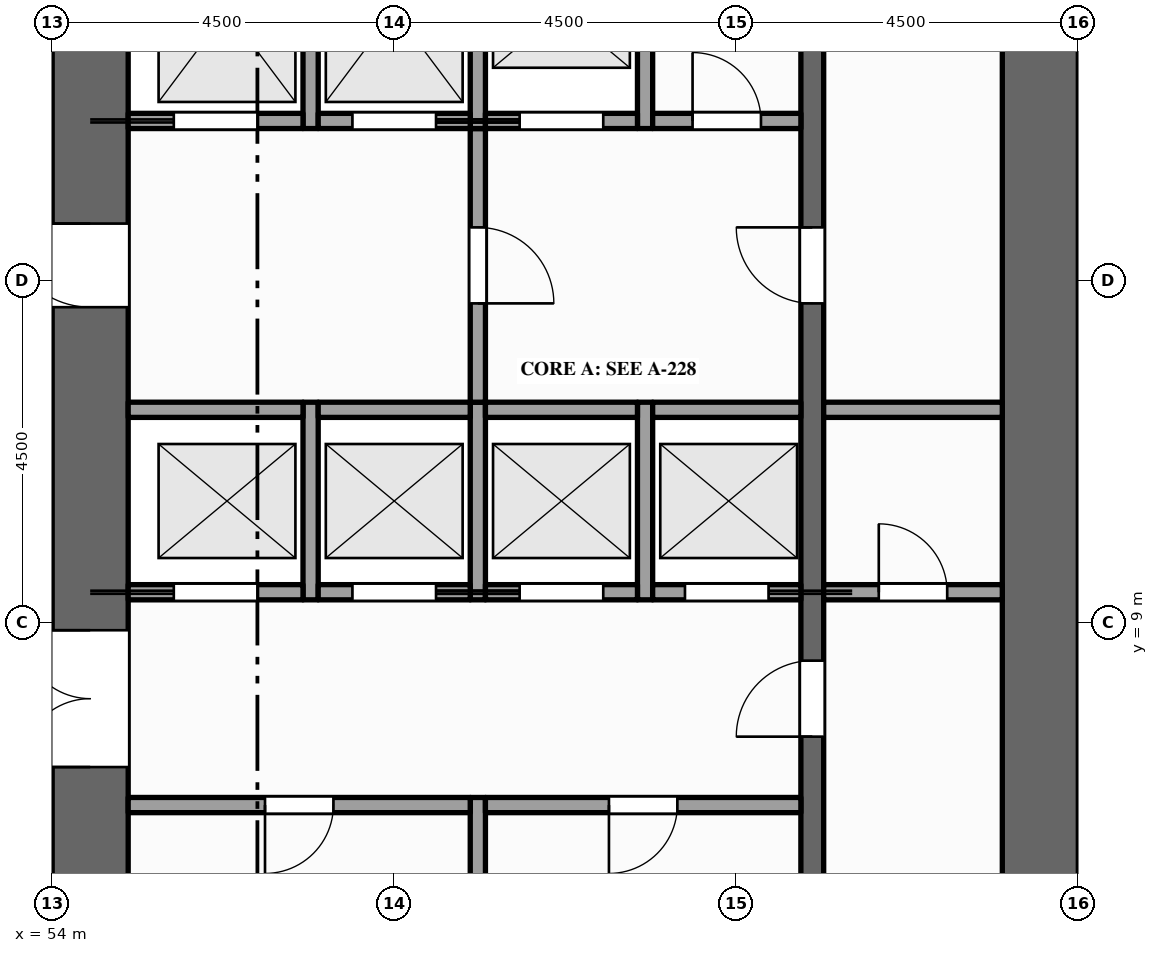
"""IFC4 building model, lengths in metres.
Left out: names, types, materials, properties, quantities, classifications, styles, units other than length and angle.
Written with IfcOpenShell. Run it as: python <this file> out.ifc"""

import sys

from ifc_helpers import new_model, si_unit, direction, frame, frame_2d, origin, place, context, subcontext, project, spatial, rectangle, extrude, element, fill, save


model = new_model("IFC4")
c1 = context("Model", 3, precision=1e-05, world=origin(), true_north=direction((0.0, 1.0)))
c2 = subcontext(c1, "Body", "Model", "MODEL_VIEW")
j1 = project(units=[si_unit("LENGTHUNIT", "METRE"), si_unit("PLANEANGLEUNIT", "RADIAN")], contexts=[c1])
p1 = place(None, origin())
s1 = spatial("IfcSite", under=j1, at=p1, CompositionType="ELEMENT")
p2 = place(p1, origin())
s2 = spatial("IfcBuilding", under=s1, at=p2, CompositionType="ELEMENT")
p3 = place(p2, frame((0.0, 0.0, 151.0)))
s3 = spatial("IfcBuildingStorey", under=s2, at=p3, CompositionType="ELEMENT", Elevation=151.0)
p4 = place(p3, frame((54.5, 1.0, -0.15), z_axis=(0.0, 0.0, 1.0), x_axis=(0.0, 1.0, 0.0)))
e1 = element("IfcWall", 1, at=p4, inside=s3, PredefinedType="SHEAR", context=c2, shape_type="SweptSolid", body=[
    extrude(rectangle(XDim=20.5, YDim=1.0, at=frame_2d((10.25, 0.0))), origin(), (0.0, 0.0, 1.0), 4.0),
])
p5 = place(p4, frame((6.1, 0.0, 0.15)))
e2 = element("IfcOpeningElement", 2, at=p5, cuts=e1, PredefinedType="OPENING", context=c2, shape_type="SweptSolid", body=[
    extrude(rectangle(XDim=1.8, YDim=2.1, at=frame_2d((0.9, 1.05))), frame((0.0, 0.51, 0.0), z_axis=(0.0, -1.0, 0.0), x_axis=(1.0, 0.0, 0.0)), (0.0, 0.0, 1.0), 1.02),
])
p6 = place(p4, frame((12.15, 0.0, 0.15)))
e3 = element("IfcOpeningElement", 3, at=p6, cuts=e1, PredefinedType="OPENING", context=c2, shape_type="SweptSolid", body=[
    extrude(rectangle(XDim=1.1, YDim=2.1, at=frame_2d((0.55, 1.05))), frame((0.0, 0.51, 0.0), z_axis=(0.0, -1.0, 0.0), x_axis=(1.0, 0.0, 0.0)), (0.0, 0.0, 1.0), 1.02),
])
p7 = place(p4, frame((1.15, 0.0, 0.15)))
e4 = element("IfcOpeningElement", 4, at=p7, cuts=e1, PredefinedType="OPENING", context=c2, shape_type="SweptSolid", body=[
    extrude(rectangle(XDim=1.1, YDim=2.1, at=frame_2d((0.55, 1.05))), frame((0.0, 0.51, 0.0), z_axis=(0.0, -1.0, 0.0), x_axis=(1.0, 0.0, 0.0)), (0.0, 0.0, 1.0), 1.02),
])
p8 = place(p4, frame((18.35, 0.0, 0.15)))
e5 = element("IfcOpeningElement", 5, at=p8, cuts=e1, PredefinedType="OPENING", context=c2, shape_type="SweptSolid", body=[
    extrude(rectangle(XDim=1.1, YDim=2.1, at=frame_2d((0.55, 1.05))), frame((0.0, 0.51, 0.0), z_axis=(0.0, -1.0, 0.0), x_axis=(1.0, 0.0, 0.0)), (0.0, 0.0, 1.0), 1.02),
])
p9 = place(p3, frame((67.0, 1.0, -0.15), z_axis=(0.0, 0.0, 1.0), x_axis=(0.0, 1.0, 0.0)))
e6 = element("IfcWall", 6, at=p9, inside=s3, PredefinedType="SHEAR", context=c2, shape_type="SweptSolid", body=[
    extrude(rectangle(XDim=20.5, YDim=1.0, at=frame_2d((10.25, 0.0))), origin(), (0.0, 0.0, 1.0), 4.0),
])
p10 = place(p3, frame((57.4, 9.3, 0.0), z_axis=(0.0, 0.0, 1.0), x_axis=(0.0, 1.0, 0.0)))
e7 = element("IfcWall", 7, at=p10, inside=s3, PredefinedType="SOLIDWALL", context=c2, shape_type="SweptSolid", body=[
    extrude(rectangle(XDim=2.6, YDim=0.2, at=frame_2d((1.3, 0.0))), origin(), (0.0, 0.0, 1.0), 3.85),
])
p11 = place(p3, frame((57.4, 15.5, 0.0), z_axis=(0.0, 0.0, 1.0), x_axis=(0.0, 1.0, 0.0)))
e8 = element("IfcWall", 8, at=p11, inside=s3, PredefinedType="SOLIDWALL", context=c2, shape_type="SweptSolid", body=[
    extrude(rectangle(XDim=2.875, YDim=0.2, at=frame_2d((1.438, 0.0))), origin(), (0.0, 0.0, 1.0), 3.85),
])
p12 = place(p3, frame((59.6, 4.325, 0.0), z_axis=(0.0, 0.0, 1.0), x_axis=(0.0, 1.0, 0.0)))
e9 = element("IfcWall", 9, at=p12, inside=s3, PredefinedType="PARTITIONING", context=c2, shape_type="SweptSolid", body=[
    extrude(rectangle(XDim=2.375, YDim=0.2, at=frame_2d((1.188, 0.0))), origin(), (0.0, 0.0, 1.0), 3.85),
])
p13 = place(p3, frame((59.6, 9.3, 0.0), z_axis=(0.0, 0.0, 1.0), x_axis=(0.0, 1.0, 0.0)))
e10 = element("IfcWall", 10, at=p13, inside=s3, PredefinedType="SOLIDWALL", context=c2, shape_type="SweptSolid", body=[
    extrude(rectangle(XDim=2.6, YDim=0.2, at=frame_2d((1.3, 0.0))), origin(), (0.0, 0.0, 1.0), 3.85),
])
p14 = place(p3, frame((59.6, 11.9, 0.0), z_axis=(0.0, 0.0, 1.0), x_axis=(0.0, 1.0, 0.0)))
e11 = element("IfcWall", 11, at=p14, inside=s3, PredefinedType="PARTITIONING", context=c2, shape_type="SweptSolid", body=[
    extrude(rectangle(XDim=3.6, YDim=0.2, at=frame_2d((1.8, 0.0))), origin(), (0.0, 0.0, 1.0), 3.85),
])
p15 = place(p14, frame((1.3, 0.0, 0.0)))
e12 = element("IfcOpeningElement", 12, at=p15, cuts=e11, PredefinedType="OPENING", context=c2, shape_type="SweptSolid", body=[
    extrude(rectangle(XDim=1.0, YDim=2.1, at=frame_2d((0.5, 1.05))), frame((0.0, 0.11, 0.0), z_axis=(0.0, -1.0, 0.0), x_axis=(1.0, 0.0, 0.0)), (0.0, 0.0, 1.0), 0.22),
])
p16 = place(p3, frame((59.6, 15.5, 0.0), z_axis=(0.0, 0.0, 1.0), x_axis=(0.0, 1.0, 0.0)))
e13 = element("IfcWall", 13, at=p16, inside=s3, PredefinedType="SOLIDWALL", context=c2, shape_type="SweptSolid", body=[
    extrude(rectangle(XDim=2.875, YDim=0.2, at=frame_2d((1.438, 0.0))), origin(), (0.0, 0.0, 1.0), 3.85),
])
p17 = place(p3, frame((61.8, 9.3, 0.0), z_axis=(0.0, 0.0, 1.0), x_axis=(0.0, 1.0, 0.0)))
e14 = element("IfcWall", 14, at=p17, inside=s3, PredefinedType="SOLIDWALL", context=c2, shape_type="SweptSolid", body=[
    extrude(rectangle(XDim=2.6, YDim=0.2, at=frame_2d((1.3, 0.0))), origin(), (0.0, 0.0, 1.0), 3.85),
])
p18 = place(p3, frame((61.8, 15.5, 0.0), z_axis=(0.0, 0.0, 1.0), x_axis=(0.0, 1.0, 0.0)))
e15 = element("IfcWall", 15, at=p18, inside=s3, PredefinedType="SOLIDWALL", context=c2, shape_type="SweptSolid", body=[
    extrude(rectangle(XDim=3.1, YDim=0.2, at=frame_2d((1.55, 0.0))), origin(), (0.0, 0.0, 1.0), 3.85),
])
p19 = place(p3, frame((64.0, 4.1, 0.0), z_axis=(0.0, 0.0, 1.0), x_axis=(0.0, 1.0, 0.0)))
e16 = element("IfcWall", 16, at=p19, inside=s3, PredefinedType="SHEAR", context=c2, shape_type="SweptSolid", body=[
    extrude(rectangle(XDim=14.5, YDim=0.3, at=frame_2d((7.25, 0.0))), origin(), (0.0, 0.0, 1.0), 3.85),
])
p20 = place(p19, frame((3.4, 0.0, 0.0)))
e17 = element("IfcOpeningElement", 17, at=p20, cuts=e16, PredefinedType="OPENING", context=c2, shape_type="SweptSolid", body=[
    extrude(rectangle(XDim=1.0, YDim=2.1, at=frame_2d((0.5, 1.05))), frame((0.0, 0.16, 0.0), z_axis=(0.0, -1.0, 0.0), x_axis=(1.0, 0.0, 0.0)), (0.0, 0.0, 1.0), 0.32),
])
p21 = place(p19, frame((9.1, 0.0, 0.0)))
e18 = element("IfcOpeningElement", 18, at=p21, cuts=e16, PredefinedType="OPENING", context=c2, shape_type="SweptSolid", body=[
    extrude(rectangle(XDim=1.0, YDim=2.1, at=frame_2d((0.5, 1.05))), frame((0.0, 0.16, 0.0), z_axis=(0.0, -1.0, 0.0), x_axis=(1.0, 0.0, 0.0)), (0.0, 0.0, 1.0), 0.32),
])
p22 = place(p3, frame((55.0, 6.6, 0.0), z_axis=(0.0, 0.0, 1.0), x_axis=(1.0, 0.0, 0.0)))
e19 = element("IfcWall", 19, at=p22, inside=s3, PredefinedType="PARTITIONING", context=c2, shape_type="SweptSolid", body=[
    extrude(rectangle(XDim=4.5, YDim=0.2, at=frame_2d((2.25, 0.0))), origin(), (0.0, 0.0, 1.0), 3.85),
])
p23 = place(p22, frame((1.8, 0.0, 0.0)))
e20 = element("IfcOpeningElement", 20, at=p23, cuts=e19, PredefinedType="OPENING", context=c2, shape_type="SweptSolid", body=[
    extrude(rectangle(XDim=0.9, YDim=2.1, at=frame_2d((0.45, 1.05))), frame((0.0, 0.11, 0.0), z_axis=(0.0, -1.0, 0.0), x_axis=(1.0, 0.0, 0.0)), (0.0, 0.0, 1.0), 0.22),
])
p24 = place(p3, frame((59.7, 6.6, 0.0), z_axis=(0.0, 0.0, 1.0), x_axis=(1.0, 0.0, 0.0)))
e21 = element("IfcWall", 21, at=p24, inside=s3, PredefinedType="PARTITIONING", context=c2, shape_type="SweptSolid", body=[
    extrude(rectangle(XDim=4.15, YDim=0.2, at=frame_2d((2.075, 0.0))), origin(), (0.0, 0.0, 1.0), 3.85),
])
p25 = place(p24, frame((1.625, 0.0, 0.0)))
e22 = element("IfcOpeningElement", 22, at=p25, cuts=e21, PredefinedType="OPENING", context=c2, shape_type="SweptSolid", body=[
    extrude(rectangle(XDim=0.9, YDim=2.1, at=frame_2d((0.45, 1.05))), frame((0.0, 0.11, 0.0), z_axis=(0.0, -1.0, 0.0), x_axis=(1.0, 0.0, 0.0)), (0.0, 0.0, 1.0), 0.22),
])
p26 = place(p3, frame((55.0, 9.4, 0.0), z_axis=(0.0, 0.0, 1.0), x_axis=(1.0, 0.0, 0.0)))
e23 = element("IfcWall", 23, at=p26, inside=s3, PredefinedType="SOLIDWALL", context=c2, shape_type="SweptSolid", body=[
    extrude(rectangle(XDim=2.3, YDim=0.2, at=frame_2d((1.15, 0.0))), origin(), (0.0, 0.0, 1.0), 3.85),
])
p27 = place(p26, frame((0.6, 0.0, 0.012)))
e24 = element("IfcOpeningElement", 24, at=p27, cuts=e23, PredefinedType="OPENING", context=c2, shape_type="SweptSolid", body=[
    extrude(rectangle(XDim=1.1, YDim=2.1, at=frame_2d((0.55, 1.05))), frame((0.0, 0.11, 0.0), z_axis=(0.0, -1.0, 0.0), x_axis=(1.0, 0.0, 0.0)), (0.0, 0.0, 1.0), 0.22),
])
p28 = place(p3, frame((57.5, 9.4, 0.0), z_axis=(0.0, 0.0, 1.0), x_axis=(1.0, 0.0, 0.0)))
e25 = element("IfcWall", 25, at=p28, inside=s3, PredefinedType="SOLIDWALL", context=c2, shape_type="SweptSolid", body=[
    extrude(rectangle(XDim=2.0, YDim=0.2, at=frame_2d((1.0, 0.0))), origin(), (0.0, 0.0, 1.0), 3.85),
])
p29 = place(p28, frame((0.45, 0.0, 0.012)))
e26 = element("IfcOpeningElement", 26, at=p29, cuts=e25, PredefinedType="OPENING", context=c2, shape_type="SweptSolid", body=[
    extrude(rectangle(XDim=1.1, YDim=2.1, at=frame_2d((0.55, 1.05))), frame((0.0, 0.11, 0.0), z_axis=(0.0, -1.0, 0.0), x_axis=(1.0, 0.0, 0.0)), (0.0, 0.0, 1.0), 0.22),
])
p30 = place(p3, frame((59.7, 9.4, 0.0), z_axis=(0.0, 0.0, 1.0), x_axis=(1.0, 0.0, 0.0)))
e27 = element("IfcWall", 27, at=p30, inside=s3, PredefinedType="SOLIDWALL", context=c2, shape_type="SweptSolid", body=[
    extrude(rectangle(XDim=2.0, YDim=0.2, at=frame_2d((1.0, 0.0))), origin(), (0.0, 0.0, 1.0), 3.85),
])
p31 = place(p30, frame((0.45, 0.0, 0.012)))
e28 = element("IfcOpeningElement", 28, at=p31, cuts=e27, PredefinedType="OPENING", context=c2, shape_type="SweptSolid", body=[
    extrude(rectangle(XDim=1.1, YDim=2.1, at=frame_2d((0.55, 1.05))), frame((0.0, 0.11, 0.0), z_axis=(0.0, -1.0, 0.0), x_axis=(1.0, 0.0, 0.0)), (0.0, 0.0, 1.0), 0.22),
])
p32 = place(p3, frame((61.9, 9.4, 0.0), z_axis=(0.0, 0.0, 1.0), x_axis=(1.0, 0.0, 0.0)))
e29 = element("IfcWall", 29, at=p32, inside=s3, PredefinedType="SOLIDWALL", context=c2, shape_type="SweptSolid", body=[
    extrude(rectangle(XDim=1.95, YDim=0.2, at=frame_2d((0.975, 0.0))), origin(), (0.0, 0.0, 1.0), 3.85),
])
p33 = place(p32, frame((0.425, 0.0, 0.012)))
e30 = element("IfcOpeningElement", 30, at=p33, cuts=e29, PredefinedType="OPENING", context=c2, shape_type="SweptSolid", body=[
    extrude(rectangle(XDim=1.1, YDim=2.1, at=frame_2d((0.55, 1.05))), frame((0.0, 0.11, 0.0), z_axis=(0.0, -1.0, 0.0), x_axis=(1.0, 0.0, 0.0)), (0.0, 0.0, 1.0), 0.22),
])
p34 = place(p3, frame((64.15, 9.4, 0.0), z_axis=(0.0, 0.0, 1.0), x_axis=(1.0, 0.0, 0.0)))
e31 = element("IfcWall", 31, at=p34, inside=s3, PredefinedType="PARTITIONING", context=c2, shape_type="SweptSolid", body=[
    extrude(rectangle(XDim=2.35, YDim=0.2, at=frame_2d((1.175, 0.0))), origin(), (0.0, 0.0, 1.0), 3.85),
])
p35 = place(p34, frame((0.725, 0.0, 0.0)))
e32 = element("IfcOpeningElement", 32, at=p35, cuts=e31, PredefinedType="OPENING", context=c2, shape_type="SweptSolid", body=[
    extrude(rectangle(XDim=0.9, YDim=2.1, at=frame_2d((0.45, 1.05))), frame((0.0, 0.11, 0.0), z_axis=(0.0, -1.0, 0.0), x_axis=(1.0, 0.0, 0.0)), (0.0, 0.0, 1.0), 0.22),
])
p36 = place(p3, frame((55.0, 11.8, 0.0), z_axis=(0.0, 0.0, 1.0), x_axis=(1.0, 0.0, 0.0)))
e33 = element("IfcWall", 33, at=p36, inside=s3, PredefinedType="SOLIDWALL", context=c2, shape_type="SweptSolid", body=[
    extrude(rectangle(XDim=2.3, YDim=0.2, at=frame_2d((1.15, 0.0))), origin(), (0.0, 0.0, 1.0), 3.85),
])
for number, where, z_axis, x_axis in (
    (34, (57.5, 11.8, 0.0), (0.0, 0.0, 1.0), (1.0, 0.0, 0.0)),
    (35, (59.7, 11.8, 0.0), (0.0, 0.0, 1.0), (1.0, 0.0, 0.0)),
):
    element("IfcWall", number, at=place(p3, frame(where, z_axis=z_axis, x_axis=x_axis)), inside=s3, PredefinedType="SOLIDWALL", context=c2, shape_type="SweptSolid", body=[
        extrude(rectangle(XDim=2.0, YDim=0.2, at=frame_2d((1.0, 0.0))), origin(), (0.0, 0.0, 1.0), 3.85),
    ])
p37 = place(p3, frame((61.9, 11.8, 0.0), z_axis=(0.0, 0.0, 1.0), x_axis=(1.0, 0.0, 0.0)))
e36 = element("IfcWall", 36, at=p37, inside=s3, PredefinedType="SOLIDWALL", context=c2, shape_type="SweptSolid", body=[
    extrude(rectangle(XDim=1.95, YDim=0.2, at=frame_2d((0.975, 0.0))), origin(), (0.0, 0.0, 1.0), 3.85),
])
p38 = place(p3, frame((64.15, 11.8, 0.0), z_axis=(0.0, 0.0, 1.0), x_axis=(1.0, 0.0, 0.0)))
e37 = element("IfcWall", 37, at=p38, inside=s3, PredefinedType="PARTITIONING", context=c2, shape_type="SweptSolid", body=[
    extrude(rectangle(XDim=2.35, YDim=0.2, at=frame_2d((1.175, 0.0))), origin(), (0.0, 0.0, 1.0), 3.85),
])
p39 = place(p3, frame((55.0, 15.6, 0.0), z_axis=(0.0, 0.0, 1.0), x_axis=(1.0, 0.0, 0.0)))
e38 = element("IfcWall", 38, at=p39, inside=s3, PredefinedType="SOLIDWALL", context=c2, shape_type="SweptSolid", body=[
    extrude(rectangle(XDim=2.3, YDim=0.2, at=frame_2d((1.15, 0.0))), origin(), (0.0, 0.0, 1.0), 3.85),
])
p40 = place(p39, frame((0.6, 0.0, 0.012)))
e39 = element("IfcOpeningElement", 39, at=p40, cuts=e38, PredefinedType="OPENING", context=c2, shape_type="SweptSolid", body=[
    extrude(rectangle(XDim=1.1, YDim=2.1, at=frame_2d((0.55, 1.05))), frame((0.0, 0.11, 0.0), z_axis=(0.0, -1.0, 0.0), x_axis=(1.0, 0.0, 0.0)), (0.0, 0.0, 1.0), 0.22),
])
p41 = place(p3, frame((57.5, 15.6, 0.0), z_axis=(0.0, 0.0, 1.0), x_axis=(1.0, 0.0, 0.0)))
e40 = element("IfcWall", 40, at=p41, inside=s3, PredefinedType="SOLIDWALL", context=c2, shape_type="SweptSolid", body=[
    extrude(rectangle(XDim=2.0, YDim=0.2, at=frame_2d((1.0, 0.0))), origin(), (0.0, 0.0, 1.0), 3.85),
])
p42 = place(p41, frame((0.45, 0.0, 0.012)))
e41 = element("IfcOpeningElement", 41, at=p42, cuts=e40, PredefinedType="OPENING", context=c2, shape_type="SweptSolid", body=[
    extrude(rectangle(XDim=1.1, YDim=2.1, at=frame_2d((0.55, 1.05))), frame((0.0, 0.11, 0.0), z_axis=(0.0, -1.0, 0.0), x_axis=(1.0, 0.0, 0.0)), (0.0, 0.0, 1.0), 0.22),
])
p43 = place(p3, frame((59.7, 15.6, 0.0), z_axis=(0.0, 0.0, 1.0), x_axis=(1.0, 0.0, 0.0)))
e42 = element("IfcWall", 42, at=p43, inside=s3, PredefinedType="SOLIDWALL", context=c2, shape_type="SweptSolid", body=[
    extrude(rectangle(XDim=2.0, YDim=0.2, at=frame_2d((1.0, 0.0))), origin(), (0.0, 0.0, 1.0), 3.85),
])
p44 = place(p43, frame((0.45, 0.0, 0.012)))
e43 = element("IfcOpeningElement", 43, at=p44, cuts=e42, PredefinedType="OPENING", context=c2, shape_type="SweptSolid", body=[
    extrude(rectangle(XDim=1.1, YDim=2.1, at=frame_2d((0.55, 1.05))), frame((0.0, 0.11, 0.0), z_axis=(0.0, -1.0, 0.0), x_axis=(1.0, 0.0, 0.0)), (0.0, 0.0, 1.0), 0.22),
])
p45 = place(p3, frame((61.9, 15.6, 0.0), z_axis=(0.0, 0.0, 1.0), x_axis=(1.0, 0.0, 0.0)))
e44 = element("IfcWall", 44, at=p45, inside=s3, PredefinedType="PARTITIONING", context=c2, shape_type="SweptSolid", body=[
    extrude(rectangle(XDim=1.95, YDim=0.2, at=frame_2d((0.975, 0.0))), origin(), (0.0, 0.0, 1.0), 3.85),
])
p46 = place(p45, frame((0.525, 0.0, 0.0)))
e45 = element("IfcOpeningElement", 45, at=p46, cuts=e44, PredefinedType="OPENING", context=c2, shape_type="SweptSolid", body=[
    extrude(rectangle(XDim=0.9, YDim=2.1, at=frame_2d((0.45, 1.05))), frame((0.0, 0.11, 0.0), z_axis=(0.0, -1.0, 0.0), x_axis=(1.0, 0.0, 0.0)), (0.0, 0.0, 1.0), 0.22),
])
p47 = place(p27, origin())
e46 = element("IfcDoor", 46, at=p47, inside=s3, OperationType="SLIDING_TO_LEFT", PredefinedType="DOOR", context=c2, shape_type="SweptSolid", body=[
    extrude(rectangle(XDim=1.1, YDim=2.1, at=frame_2d((0.55, 1.05))), frame((0.0, 0.025, 0.0), z_axis=(0.0, -1.0, 0.0), x_axis=(1.0, 0.0, 0.0)), (0.0, 0.0, 1.0), 0.05),
])
fill(e24, e46)
p48 = place(p29, origin())
e47 = element("IfcDoor", 47, at=p48, inside=s3, OperationType="SLIDING_TO_RIGHT", PredefinedType="DOOR", context=c2, shape_type="SweptSolid", body=[
    extrude(rectangle(XDim=1.1, YDim=2.1, at=frame_2d((0.55, 1.05))), frame((0.0, 0.025, 0.0), z_axis=(0.0, -1.0, 0.0), x_axis=(1.0, 0.0, 0.0)), (0.0, 0.0, 1.0), 0.05),
])
fill(e26, e47)
p49 = place(p31, origin())
e48 = element("IfcDoor", 48, at=p49, inside=s3, OperationType="SLIDING_TO_LEFT", PredefinedType="DOOR", context=c2, shape_type="SweptSolid", body=[
    extrude(rectangle(XDim=1.1, YDim=2.1, at=frame_2d((0.55, 1.05))), frame((0.0, 0.025, 0.0), z_axis=(0.0, -1.0, 0.0), x_axis=(1.0, 0.0, 0.0)), (0.0, 0.0, 1.0), 0.05),
])
fill(e28, e48)
p50 = place(p33, origin())
e49 = element("IfcDoor", 49, at=p50, inside=s3, OperationType="SLIDING_TO_RIGHT", PredefinedType="DOOR", context=c2, shape_type="SweptSolid", body=[
    extrude(rectangle(XDim=1.1, YDim=2.1, at=frame_2d((0.55, 1.05))), frame((0.0, 0.025, 0.0), z_axis=(0.0, -1.0, 0.0), x_axis=(1.0, 0.0, 0.0)), (0.0, 0.0, 1.0), 0.05),
])
fill(e30, e49)
p51 = place(p40, origin())
e50 = element("IfcDoor", 50, at=p51, inside=s3, OperationType="SLIDING_TO_LEFT", PredefinedType="DOOR", context=c2, shape_type="SweptSolid", body=[
    extrude(rectangle(XDim=1.1, YDim=2.1, at=frame_2d((0.55, 1.05))), frame((0.0, 0.025, 0.0), z_axis=(0.0, -1.0, 0.0), x_axis=(1.0, 0.0, 0.0)), (0.0, 0.0, 1.0), 0.05),
])
fill(e39, e50)
p52 = place(p42, origin())
e51 = element("IfcDoor", 51, at=p52, inside=s3, OperationType="SLIDING_TO_RIGHT", PredefinedType="DOOR", context=c2, shape_type="SweptSolid", body=[
    extrude(rectangle(XDim=1.1, YDim=2.1, at=frame_2d((0.55, 1.05))), frame((0.0, 0.025, 0.0), z_axis=(0.0, -1.0, 0.0), x_axis=(1.0, 0.0, 0.0)), (0.0, 0.0, 1.0), 0.05),
])
fill(e41, e51)
p53 = place(p44, origin())
e52 = element("IfcDoor", 52, at=p53, inside=s3, OperationType="SLIDING_TO_LEFT", PredefinedType="DOOR", context=c2, shape_type="SweptSolid", body=[
    extrude(rectangle(XDim=1.1, YDim=2.1, at=frame_2d((0.55, 1.05))), frame((0.0, 0.025, 0.0), z_axis=(0.0, -1.0, 0.0), x_axis=(1.0, 0.0, 0.0)), (0.0, 0.0, 1.0), 0.05),
])
fill(e43, e52)
p54 = place(p5, origin())
e53 = element("IfcDoor", 53, at=p54, inside=s3, OperationType="DOUBLE_DOOR_SINGLE_SWING", PredefinedType="DOOR", context=c2, shape_type="SweptSolid", body=[
    extrude(rectangle(XDim=1.8, YDim=2.1, at=frame_2d((0.9, 1.05))), frame((0.0, 0.025, 0.0), z_axis=(0.0, -1.0, 0.0), x_axis=(1.0, 0.0, 0.0)), (0.0, 0.0, 1.0), 0.05),
])
fill(e2, e53)
p55 = place(p20, origin())
e54 = element("IfcDoor", 54, at=p55, inside=s3, OperationType="SINGLE_SWING_LEFT", PredefinedType="DOOR", context=c2, shape_type="SweptSolid", body=[
    extrude(rectangle(XDim=1.0, YDim=2.1, at=frame_2d((0.5, 1.05))), frame((0.0, 0.025, 0.0), z_axis=(0.0, -1.0, 0.0), x_axis=(1.0, 0.0, 0.0)), (0.0, 0.0, 1.0), 0.05),
])
fill(e17, e54)
p56 = place(p6, origin())
e55 = element("IfcDoor", 55, at=p56, inside=s3, OperationType="SINGLE_SWING_RIGHT", PredefinedType="DOOR", context=c2, shape_type="SweptSolid", body=[
    extrude(rectangle(XDim=1.1, YDim=2.1, at=frame_2d((0.55, 1.05))), frame((0.0, 0.025, 0.0), z_axis=(0.0, -1.0, 0.0), x_axis=(1.0, 0.0, 0.0)), (0.0, 0.0, 1.0), 0.05),
])
fill(e3, e55)
p57 = place(p15, origin())
e56 = element("IfcDoor", 56, at=p57, inside=s3, OperationType="SINGLE_SWING_LEFT", PredefinedType="DOOR", context=c2, shape_type="SweptSolid", body=[
    extrude(rectangle(XDim=1.0, YDim=2.1, at=frame_2d((0.5, 1.05))), frame((0.0, 0.025, 0.0), z_axis=(0.0, -1.0, 0.0), x_axis=(1.0, 0.0, 0.0)), (0.0, 0.0, 1.0), 0.05),
])
fill(e12, e56)
p58 = place(p21, origin())
e57 = element("IfcDoor", 57, at=p58, inside=s3, OperationType="SINGLE_SWING_RIGHT", PredefinedType="DOOR", context=c2, shape_type="SweptSolid", body=[
    extrude(rectangle(XDim=1.0, YDim=2.1, at=frame_2d((0.5, 1.05))), frame((0.0, 0.025, 0.0), z_axis=(0.0, -1.0, 0.0), x_axis=(1.0, 0.0, 0.0)), (0.0, 0.0, 1.0), 0.05),
])
fill(e18, e57)
p59 = place(p35, origin())
e58 = element("IfcDoor", 58, at=p59, inside=s3, OperationType="SINGLE_SWING_LEFT", PredefinedType="DOOR", context=c2, shape_type="SweptSolid", body=[
    extrude(rectangle(XDim=0.9, YDim=2.1, at=frame_2d((0.45, 1.05))), frame((0.0, 0.025, 0.0), z_axis=(0.0, -1.0, 0.0), x_axis=(1.0, 0.0, 0.0)), (0.0, 0.0, 1.0), 0.05),
])
fill(e32, e58)
p60 = place(p23, origin())
e59 = element("IfcDoor", 59, at=p60, inside=s3, OperationType="SINGLE_SWING_LEFT", PredefinedType="DOOR", context=c2, shape_type="SweptSolid", body=[
    extrude(rectangle(XDim=0.9, YDim=2.1, at=frame_2d((0.45, 1.05))), frame((0.0, 0.025, 0.0), z_axis=(0.0, -1.0, 0.0), x_axis=(1.0, 0.0, 0.0)), (0.0, 0.0, 1.0), 0.05),
])
fill(e20, e59)
p61 = place(p25, origin())
e60 = element("IfcDoor", 60, at=p61, inside=s3, OperationType="SINGLE_SWING_LEFT", PredefinedType="DOOR", context=c2, shape_type="SweptSolid", body=[
    extrude(rectangle(XDim=0.9, YDim=2.1, at=frame_2d((0.45, 1.05))), frame((0.0, 0.025, 0.0), z_axis=(0.0, -1.0, 0.0), x_axis=(1.0, 0.0, 0.0)), (0.0, 0.0, 1.0), 0.05),
])
fill(e22, e60)
p62 = place(p46, origin())
e61 = element("IfcDoor", 61, at=p62, inside=s3, OperationType="SINGLE_SWING_LEFT", PredefinedType="DOOR", context=c2, shape_type="SweptSolid", body=[
    extrude(rectangle(XDim=0.9, YDim=2.1, at=frame_2d((0.45, 1.05))), frame((0.0, 0.025, 0.0), z_axis=(0.0, -1.0, 0.0), x_axis=(1.0, 0.0, 0.0)), (0.0, 0.0, 1.0), 0.05),
])
fill(e45, e61)
save(model, sys.argv[1])
